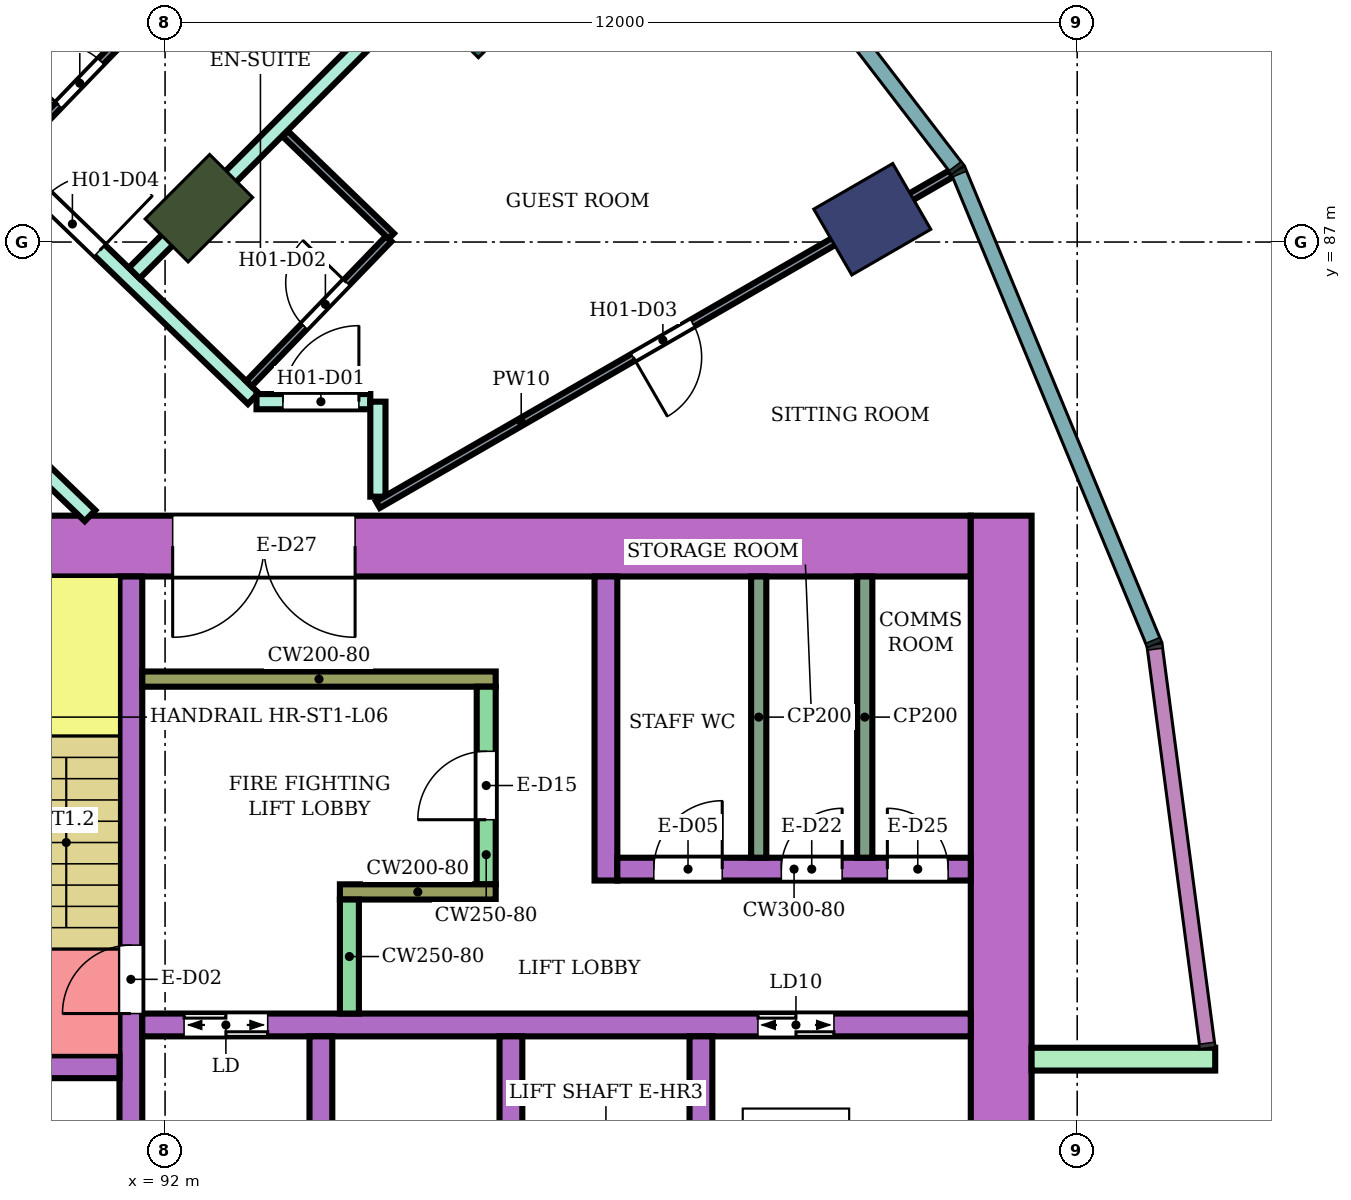
"""IFC4 building model, lengths in metres.
Left out: names, types, materials, properties, quantities, classifications, styles, units other than length and angle.
Written with IfcOpenShell. Run it as: python <this file> out.ifc"""

import sys

from ifc_helpers import new_model, si_unit, direction, frame, frame_2d, origin, origin_2d, place, context, subcontext, project, spatial, rectangle, extrude, element, fill, save


model = new_model("IFC4")
c1 = context("Model", 3, precision=1e-05, world=origin(), true_north=direction((0.0, 1.0)))
c2 = subcontext(c1, "Body", "Model", "MODEL_VIEW")
j1 = project(units=[si_unit("LENGTHUNIT", "METRE"), si_unit("PLANEANGLEUNIT", "RADIAN")], contexts=[c1])
p1 = place(None, origin())
s1 = spatial("IfcSite", under=j1, at=p1, CompositionType="ELEMENT")
p2 = place(p1, origin())
s2 = spatial("IfcBuilding", under=s1, at=p2, CompositionType="ELEMENT")
p3 = place(p2, frame((0.0, 0.0, 32.6)))
s3 = spatial("IfcBuildingStorey", under=s2, at=p3, CompositionType="ELEMENT", Elevation=32.6)
p4 = place(p3, frame((101.304, 87.3, 0.0), z_axis=(0.0, 0.0, 1.0), x_axis=(0.866025403784, 0.5, 0.0)))
e1 = element("IfcColumn", 1, at=p4, inside=s3, PredefinedType="COLUMN", context=c2, shape_type="SweptSolid", body=[
    extrude(rectangle(XDim=1.2, YDim=1.0, at=origin_2d()), origin(), (0.0, 0.0, 1.0), 3.8),
])
p5 = place(p3, frame((92.445, 87.445, 0.0), z_axis=(0.0, 0.0, 1.0), x_axis=(0.707106781187, 0.707106781187, 0.0)))
e2 = element("IfcColumn", 2, at=p5, inside=s3, PredefinedType="COLUMN", context=c2, shape_type="SweptSolid", body=[
    extrude(rectangle(XDim=1.2, YDim=0.8, at=origin_2d()), origin(), (0.0, 0.0, 1.0), 3.8),
])
p6 = place(p3, frame((95.91, 90.91, 0.0), z_axis=(0.0, 0.0, 1.0), x_axis=(0.707106781187, 0.707106781187, 0.0)))
e3 = element("IfcColumn", 3, at=p6, inside=s3, PredefinedType="COLUMN", context=c2, shape_type="SweptSolid", body=[
    extrude(rectangle(XDim=1.8, YDim=2.4, at=origin_2d()), origin(), (0.0, 0.0, 1.0), 3.8),
])
p7 = place(p3, frame((87.9, 83.0, 0.0), z_axis=(0.0, 0.0, 1.0), x_axis=(1.0, 0.0, 0.0)))
e4 = element("IfcWall", 4, at=p7, inside=s3, PredefinedType="SHEAR", context=c2, shape_type="SweptSolid", body=[
    extrude(rectangle(XDim=14.7, YDim=0.8, at=frame_2d((7.35, 0.0))), origin(), (0.0, 0.0, 1.0), 3.48),
])
p8 = place(p7, frame((4.2, 0.0, 0.0)))
e5 = element("IfcOpeningElement", 5, at=p8, cuts=e4, PredefinedType="OPENING", context=c2, shape_type="SweptSolid", body=[
    extrude(rectangle(XDim=2.4, YDim=2.4, at=frame_2d((1.2, 1.2))), frame((0.0, 0.41, 0.0), z_axis=(0.0, -1.0, 0.0), x_axis=(1.0, 0.0, 0.0)), (0.0, 0.0, 1.0), 0.82),
])
p9 = place(p3, frame((103.0, 66.6, 0.0), z_axis=(0.0, 0.0, 1.0), x_axis=(0.0, 1.0, 0.0)))
e6 = element("IfcWall", 6, at=p9, inside=s3, PredefinedType="SHEAR", context=c2, shape_type="SweptSolid", body=[
    extrude(rectangle(XDim=16.8, YDim=0.8, at=frame_2d((8.4, 0.0))), origin(), (0.0, 0.0, 1.0), 3.48),
])
p10 = place(p3, frame((91.55, 75.0, 0.0), z_axis=(0.0, 0.0, 1.0), x_axis=(0.0, 1.0, 0.0)))
e7 = element("IfcWall", 7, at=p10, inside=s3, PredefinedType="SHEAR", context=c2, shape_type="SweptSolid", body=[
    extrude(rectangle(XDim=7.6, YDim=0.3, at=frame_2d((3.8, 0.0))), origin(), (0.0, 0.0, 1.0), 3.48),
])
p11 = place(p10, frame((1.85, 0.0, 0.0)))
e8 = element("IfcOpeningElement", 8, at=p11, cuts=e7, PredefinedType="OPENING", context=c2, shape_type="SweptSolid", body=[
    extrude(rectangle(XDim=0.9, YDim=2.1, at=frame_2d((0.45, 1.05))), frame((0.0, 0.16, 0.0), z_axis=(0.0, -1.0, 0.0), x_axis=(1.0, 0.0, 0.0)), (0.0, 0.0, 1.0), 0.32),
])
p12 = place(p3, frame((88.35, 76.15, 0.0), z_axis=(0.0, 0.0, 1.0), x_axis=(1.0, 0.0, 0.0)))
e9 = element("IfcWall", 9, at=p12, inside=s3, PredefinedType="SHEAR", context=c2, shape_type="SweptSolid", body=[
    extrude(rectangle(XDim=3.05, YDim=0.3, at=frame_2d((1.525, 0.0))), origin(), (0.0, 0.0, 1.0), 3.48),
])
p13 = place(p12, frame((1.1, 0.0, 0.0)))
e10 = element("IfcOpeningElement", 10, at=p13, cuts=e9, PredefinedType="OPENING", context=c2, shape_type="SweptSolid", body=[
    extrude(rectangle(XDim=0.7, YDim=2.0, at=frame_2d((0.35, 1.0))), frame((0.0, 0.16, 0.0), z_axis=(0.0, -1.0, 0.0), x_axis=(1.0, 0.0, 0.0)), (0.0, 0.0, 1.0), 0.32),
])
p14 = place(p3, frame((91.7, 76.7, 0.0), z_axis=(0.0, 0.0, 1.0), x_axis=(1.0, 0.0, 0.0)))
e11 = element("IfcWall", 11, at=p14, inside=s3, PredefinedType="SHEAR", context=c2, shape_type="SweptSolid", body=[
    extrude(rectangle(XDim=10.9, YDim=0.3, at=frame_2d((5.45, 0.0))), origin(), (0.0, 0.0, 1.0), 3.48),
])
p15 = place(p14, frame((0.55, 0.0, 0.0)))
e12 = element("IfcOpeningElement", 12, at=p15, cuts=e11, PredefinedType="OPENING", context=c2, shape_type="SweptSolid", body=[
    extrude(rectangle(XDim=1.1, YDim=2.1, at=frame_2d((0.55, 1.05))), frame((0.0, 0.16, 0.0), z_axis=(0.0, -1.0, 0.0), x_axis=(1.0, 0.0, 0.0)), (0.0, 0.0, 1.0), 0.32),
])
p16 = place(p14, frame((8.1, 0.0, 0.0)))
e13 = element("IfcOpeningElement", 13, at=p16, cuts=e11, PredefinedType="OPENING", context=c2, shape_type="SweptSolid", body=[
    extrude(rectangle(XDim=1.0, YDim=2.1, at=frame_2d((0.5, 1.05))), frame((0.0, 0.16, 0.0), z_axis=(0.0, -1.0, 0.0), x_axis=(1.0, 0.0, 0.0)), (0.0, 0.0, 1.0), 0.32),
])
for number, where, z_axis, x_axis in (
    (14, (94.05, 74.0, 0.0), (0.0, 0.0, 1.0), (0.0, 1.0, 0.0)),
    (15, (96.55, 74.0, 0.0), (0.0, 0.0, 1.0), (0.0, 1.0, 0.0)),
    (16, (99.05, 74.0, 0.0), (0.0, 0.0, 1.0), (0.0, 1.0, 0.0)),
):
    element("IfcWall", number, at=place(p3, frame(where, z_axis=z_axis, x_axis=x_axis)), inside=s3, PredefinedType="SHEAR", context=c2, shape_type="SweptSolid", body=[
        extrude(rectangle(XDim=2.55, YDim=0.3, at=frame_2d((1.275, 0.0))), origin(), (0.0, 0.0, 1.0), 3.48),
    ])
p17 = place(p3, frame((91.7, 81.25, 0.0), z_axis=(0.0, 0.0, 1.0), x_axis=(1.0, 0.0, 0.0)))
e17 = element("IfcWall", 17, at=p17, inside=s3, PredefinedType="SHEAR", context=c2, shape_type="SweptSolid", body=[
    extrude(rectangle(XDim=4.65, YDim=0.2, at=frame_2d((2.325, 0.0))), origin(), (0.0, 0.0, 1.0), 3.48),
])
p18 = place(p3, frame((96.225, 78.55, 0.0), z_axis=(0.0, 0.0, 1.0), x_axis=(0.0, 1.0, 0.0)))
e18 = element("IfcWall", 18, at=p18, inside=s3, PredefinedType="SHEAR", context=c2, shape_type="SweptSolid", body=[
    extrude(rectangle(XDim=2.6, YDim=0.25, at=frame_2d((1.3, 0.0))), origin(), (0.0, 0.0, 1.0), 3.48),
])
p19 = place(p18, frame((0.85, 0.0, 0.0)))
e19 = element("IfcOpeningElement", 19, at=p19, cuts=e18, PredefinedType="OPENING", context=c2, shape_type="SweptSolid", body=[
    extrude(rectangle(XDim=0.9, YDim=2.1, at=frame_2d((0.45, 1.05))), frame((0.0, 0.135, 0.0), z_axis=(0.0, -1.0, 0.0), x_axis=(1.0, 0.0, 0.0)), (0.0, 0.0, 1.0), 0.27),
])
p20 = place(p3, frame((94.3, 78.45, 0.0), z_axis=(0.0, 0.0, 1.0), x_axis=(1.0, 0.0, 0.0)))
e20 = element("IfcWall", 20, at=p20, inside=s3, PredefinedType="SHEAR", context=c2, shape_type="SweptSolid", body=[
    extrude(rectangle(XDim=2.05, YDim=0.2, at=frame_2d((1.025, 0.0))), origin(), (0.0, 0.0, 1.0), 3.48),
])
p21 = place(p3, frame((94.425, 76.85, 0.0), z_axis=(0.0, 0.0, 1.0), x_axis=(0.0, 1.0, 0.0)))
e21 = element("IfcWall", 21, at=p21, inside=s3, PredefinedType="SHEAR", context=c2, shape_type="SweptSolid", body=[
    extrude(rectangle(XDim=1.5, YDim=0.25, at=frame_2d((0.75, 0.0))), origin(), (0.0, 0.0, 1.0), 3.48),
])
p22 = place(p3, frame((97.8, 78.6, 0.0), z_axis=(0.0, 0.0, 1.0), x_axis=(0.0, 1.0, 0.0)))
e22 = element("IfcWall", 22, at=p22, inside=s3, PredefinedType="SHEAR", context=c2, shape_type="SweptSolid", body=[
    extrude(rectangle(XDim=4.0, YDim=0.3, at=frame_2d((2.0, 0.0))), origin(), (0.0, 0.0, 1.0), 3.48),
])
p23 = place(p3, frame((97.95, 78.75, 0.0), z_axis=(0.0, 0.0, 1.0), x_axis=(1.0, 0.0, 0.0)))
e23 = element("IfcWall", 23, at=p23, inside=s3, PredefinedType="SHEAR", context=c2, shape_type="SweptSolid", body=[
    extrude(rectangle(XDim=4.65, YDim=0.3, at=frame_2d((2.325, 0.0))), origin(), (0.0, 0.0, 1.0), 3.48),
])
p24 = place(p23, frame((0.48, 0.0, 0.0)))
e24 = element("IfcOpeningElement", 24, at=p24, cuts=e23, PredefinedType="OPENING", context=c2, shape_type="SweptSolid", body=[
    extrude(rectangle(XDim=0.9, YDim=2.1, at=frame_2d((0.45, 1.05))), frame((0.0, 0.16, 0.0), z_axis=(0.0, -1.0, 0.0), x_axis=(1.0, 0.0, 0.0)), (0.0, 0.0, 1.0), 0.32),
])
p25 = place(p23, frame((2.157, 0.0, 0.0)))
e25 = element("IfcOpeningElement", 25, at=p25, cuts=e23, PredefinedType="OPENING", context=c2, shape_type="SweptSolid", body=[
    extrude(rectangle(XDim=0.8, YDim=2.1, at=frame_2d((0.4, 1.05))), frame((0.0, 0.16, 0.0), z_axis=(0.0, -1.0, 0.0), x_axis=(1.0, 0.0, 0.0)), (0.0, 0.0, 1.0), 0.32),
])
p26 = place(p23, frame((3.552, 0.0, 0.0)))
e26 = element("IfcOpeningElement", 26, at=p26, cuts=e23, PredefinedType="OPENING", context=c2, shape_type="SweptSolid", body=[
    extrude(rectangle(XDim=0.8, YDim=2.1, at=frame_2d((0.4, 1.05))), frame((0.0, 0.16, 0.0), z_axis=(0.0, -1.0, 0.0), x_axis=(1.0, 0.0, 0.0)), (0.0, 0.0, 1.0), 0.32),
])
p27 = place(p3, frame((103.4, 76.25, 0.0), z_axis=(0.0, 0.0, 1.0), x_axis=(1.0, 0.0, 0.0)))
e27 = element("IfcWall", 27, at=p27, inside=s3, PredefinedType="NOTDEFINED", context=c2, shape_type="SweptSolid", body=[
    extrude(rectangle(XDim=2.416, YDim=0.3, at=frame_2d((1.208, 0.0))), origin(), (0.0, 0.0, 1.0), 3.8),
])
p28 = place(p3, frame((87.064, 87.211, 0.0), z_axis=(0.0, 0.0, 1.0), x_axis=(0.719540958932, -0.694450004262, 0.0)))
e28 = element("IfcWall", 28, at=p28, inside=s3, PredefinedType="PARTITIONING", context=c2, shape_type="SweptSolid", body=[
    extrude(rectangle(XDim=5.488, YDim=0.2, at=frame_2d((2.744, 0.0))), origin(), (0.0, 0.0, 1.0), 3.35),
])
p29 = place(p28, frame((0.55, 0.0, 0.0)))
e29 = element("IfcOpeningElement", 29, at=p29, cuts=e28, PredefinedType="OPENING", context=c2, shape_type="SweptSolid", body=[
    extrude(rectangle(XDim=1.0, YDim=2.1, at=frame_2d((0.5, 1.05))), frame((0.0, 0.11, 0.0), z_axis=(0.0, -1.0, 0.0), x_axis=(1.0, 0.0, 0.0)), (0.0, 0.0, 1.0), 0.22),
])
p30 = place(p3, frame((88.465, 89.473, 0.0), z_axis=(0.0, 0.0, 1.0), x_axis=(0.719457552421, -0.694536413922, 0.0)))
e30 = element("IfcWall", 30, at=p30, inside=s3, PredefinedType="PARTITIONING", context=c2, shape_type="SweptSolid", body=[
    extrude(rectangle(XDim=6.524, YDim=0.2, at=frame_2d((3.262, 0.0))), origin(), (0.0, 0.0, 1.0), 3.35),
])
p31 = place(p30, frame((2.719, 0.0, 0.0)))
e31 = element("IfcOpeningElement", 31, at=p31, cuts=e30, PredefinedType="OPENING", context=c2, shape_type="SweptSolid", body=[
    extrude(rectangle(XDim=1.0, YDim=2.1, at=frame_2d((0.5, 1.05))), frame((0.0, 0.11, 0.0), z_axis=(0.0, -1.0, 0.0), x_axis=(1.0, 0.0, 0.0)), (0.0, 0.0, 1.0), 0.22),
])
p32 = place(p3, frame((88.4, 89.538, 0.0), z_axis=(0.0, 0.0, 1.0), x_axis=(0.5002401188, 0.865886726739, 0.0)))
e32 = element("IfcWall", 32, at=p32, inside=s3, PredefinedType="PARTITIONING", context=c2, shape_type="SweptSolid", body=[
    extrude(rectangle(XDim=9.008, YDim=0.2, at=frame_2d((4.504, 0.0))), origin(), (0.0, 0.0, 1.0), 3.35),
])
p33 = place(p3, frame((91.594, 86.591, 0.0), z_axis=(0.0, 0.0, 1.0), x_axis=(0.707214399597, 0.706999146394, 0.0)))
e33 = element("IfcWall", 33, at=p33, inside=s3, PredefinedType="PARTITIONING", context=c2, shape_type="SweptSolid", body=[
    extrude(rectangle(XDim=6.805, YDim=0.2, at=frame_2d((3.403, 0.0))), origin(), (0.0, 0.0, 1.0), 3.35),
])
p34 = place(p3, frame((93.203, 84.9, 0.0), z_axis=(0.0, 0.0, 1.0), x_axis=(1.0, 0.0, 0.0)))
e34 = element("IfcWall", 34, at=p34, inside=s3, PredefinedType="PARTITIONING", context=c2, shape_type="SweptSolid", body=[
    extrude(rectangle(XDim=1.497, YDim=0.2, at=frame_2d((0.749, 0.0))), origin(), (0.0, 0.0, 1.0), 3.35),
])
p35 = place(p34, frame((0.347, 0.0, 0.0)))
e35 = element("IfcOpeningElement", 35, at=p35, cuts=e34, PredefinedType="OPENING", context=c2, shape_type="SweptSolid", body=[
    extrude(rectangle(XDim=1.0, YDim=2.1, at=frame_2d((0.5, 1.05))), frame((0.0, 0.11, 0.0), z_axis=(0.0, -1.0, 0.0), x_axis=(1.0, 0.0, 0.0)), (0.0, 0.0, 1.0), 0.22),
])
p36 = place(p3, frame((94.8, 83.65, 0.0), z_axis=(0.0, 0.0, 1.0), x_axis=(0.0, 1.0, 0.0)))
e36 = element("IfcWall", 36, at=p36, inside=s3, PredefinedType="PARTITIONING", context=c2, shape_type="SweptSolid", body=[
    extrude(rectangle(XDim=1.25, YDim=0.2, at=frame_2d((0.625, 0.0))), origin(), (0.0, 0.0, 1.0), 3.35),
])
p37 = place(p3, frame((89.976, 88.154, 0.0), z_axis=(0.0, 0.0, 1.0), x_axis=(0.6945137956, 0.719479386585, 0.0)))
e37 = element("IfcWall", 37, at=p37, inside=s3, PredefinedType="PARTITIONING", context=c2, shape_type="SweptSolid", body=[
    extrude(rectangle(XDim=2.699, YDim=0.1, at=frame_2d((1.35, 0.0))), origin(), (0.0, 0.0, 1.0), 3.35),
])
p38 = place(p37, frame((0.9, 0.0, 0.0)))
e38 = element("IfcOpeningElement", 38, at=p38, cuts=e37, PredefinedType="OPENING", context=c2, shape_type="SweptSolid", body=[
    extrude(rectangle(XDim=0.8, YDim=2.1, at=frame_2d((0.4, 1.05))), frame((0.0, 0.06, 0.0), z_axis=(0.0, -1.0, 0.0), x_axis=(1.0, 0.0, 0.0)), (0.0, 0.0, 1.0), 0.12),
])
p39 = place(p3, frame((93.103, 85.136, 0.0), z_axis=(0.0, 0.0, 1.0), x_axis=(0.694324808789, 0.719661767708, 0.0)))
e39 = element("IfcWall", 39, at=p39, inside=s3, PredefinedType="PARTITIONING", context=c2, shape_type="SweptSolid", body=[
    extrude(rectangle(XDim=2.65, YDim=0.1, at=frame_2d((1.325, 0.0))), origin(), (0.0, 0.0, 1.0), 3.35),
])
p40 = place(p39, frame((1.05, 0.0, 0.0)))
e40 = element("IfcOpeningElement", 40, at=p40, cuts=e39, PredefinedType="OPENING", context=c2, shape_type="SweptSolid", body=[
    extrude(rectangle(XDim=0.8, YDim=2.1, at=frame_2d((0.4, 1.05))), frame((0.0, 0.06, 0.0), z_axis=(0.0, -1.0, 0.0), x_axis=(1.0, 0.0, 0.0)), (0.0, 0.0, 1.0), 0.12),
])
p41 = place(p3, frame((93.581, 88.425, 0.0), z_axis=(0.0, 0.0, 1.0), x_axis=(0.719336381931, -0.694661910307, 0.0)))
e41 = element("IfcWall", 41, at=p41, inside=s3, PredefinedType="PARTITIONING", context=c2, shape_type="SweptSolid", body=[
    extrude(rectangle(XDim=1.939, YDim=0.1, at=frame_2d((0.97, 0.0))), origin(), (0.0, 0.0, 1.0), 3.35),
])
p42 = place(p3, frame((94.8, 83.545, 0.0), z_axis=(0.0, 0.0, 1.0), x_axis=(0.86602264145, 0.500004784474, 0.0)))
e42 = element("IfcWall", 42, at=p42, inside=s3, PredefinedType="PARTITIONING", context=c2, shape_type="SweptSolid", body=[
    extrude(rectangle(XDim=8.708, YDim=0.1, at=frame_2d((4.354, 0.0))), origin(), (0.0, 0.0, 1.0), 3.35),
])
p43 = place(p42, frame((3.879, 0.0, 0.0)))
e43 = element("IfcOpeningElement", 43, at=p43, cuts=e42, PredefinedType="OPENING", context=c2, shape_type="SweptSolid", body=[
    extrude(rectangle(XDim=0.9, YDim=2.1, at=frame_2d((0.45, 1.05))), frame((0.0, 0.06, 0.0), z_axis=(0.0, -1.0, 0.0), x_axis=(1.0, 0.0, 0.0)), (0.0, 0.0, 1.0), 0.12),
])
for number, where, z_axis, x_axis in (
    (44, (99.81, 78.9, 0.0), (0.0, 0.0, 1.0), (0.0, 1.0, 0.0)),
    (45, (101.205, 78.9, 0.0), (0.0, 0.0, 1.0), (0.0, 1.0, 0.0)),
):
    element("IfcWall", number, at=place(p3, frame(where, z_axis=z_axis, x_axis=x_axis)), inside=s3, PredefinedType="PARTITIONING", context=c2, shape_type="SweptSolid", body=[
        extrude(rectangle(XDim=3.7, YDim=0.2, at=frame_2d((1.85, 0.0))), origin(), (0.0, 0.0, 1.0), 3.48),
    ])
p44 = place(p35, origin())
e46 = element("IfcDoor", 46, at=p44, inside=s3, OperationType="SINGLE_SWING_RIGHT", PredefinedType="DOOR", context=c2, shape_type="SweptSolid", body=[
    extrude(rectangle(XDim=1.0, YDim=2.1, at=frame_2d((0.5, 1.05))), frame((0.0, 0.025, 0.0), z_axis=(0.0, -1.0, 0.0), x_axis=(1.0, 0.0, 0.0)), (0.0, 0.0, 1.0), 0.05),
])
fill(e35, e46)
p45 = place(p40, origin())
e47 = element("IfcDoor", 47, at=p45, inside=s3, OperationType="SINGLE_SWING_RIGHT", PredefinedType="DOOR", context=c2, shape_type="SweptSolid", body=[
    extrude(rectangle(XDim=0.8, YDim=2.1, at=frame_2d((0.4, 1.05))), frame((0.0, 0.025, 0.0), z_axis=(0.0, -1.0, 0.0), x_axis=(1.0, 0.0, 0.0)), (0.0, 0.0, 1.0), 0.05),
])
fill(e40, e47)
p46 = place(p43, frame((0.9, 0.0, 0.0), z_axis=(0.0, 0.0, 1.0), x_axis=(-1.0, 0.0, 0.0)))
e48 = element("IfcDoor", 48, at=p46, inside=s3, OperationType="SINGLE_SWING_RIGHT", PredefinedType="DOOR", context=c2, shape_type="SweptSolid", body=[
    extrude(rectangle(XDim=0.9, YDim=2.1, at=frame_2d((0.45, 1.05))), frame((0.0, 0.025, 0.0), z_axis=(0.0, -1.0, 0.0), x_axis=(1.0, 0.0, 0.0)), (0.0, 0.0, 1.0), 0.05),
])
fill(e43, e48)
p47 = place(p31, origin())
e49 = element("IfcDoor", 49, at=p47, inside=s3, OperationType="SINGLE_SWING_RIGHT", PredefinedType="DOOR", context=c2, shape_type="SweptSolid", body=[
    extrude(rectangle(XDim=1.0, YDim=2.1, at=frame_2d((0.5, 1.05))), frame((0.0, 0.025, 0.0), z_axis=(0.0, -1.0, 0.0), x_axis=(1.0, 0.0, 0.0)), (0.0, 0.0, 1.0), 0.05),
])
fill(e31, e49)
p48 = place(p38, origin())
e50 = element("IfcDoor", 50, at=p48, inside=s3, OperationType="SINGLE_SWING_LEFT", PredefinedType="DOOR", context=c2, shape_type="SweptSolid", body=[
    extrude(rectangle(XDim=0.8, YDim=2.1, at=frame_2d((0.4, 1.05))), frame((0.0, 0.025, 0.0), z_axis=(0.0, -1.0, 0.0), x_axis=(1.0, 0.0, 0.0)), (0.0, 0.0, 1.0), 0.05),
])
fill(e38, e50)
p49 = place(p11, origin())
e51 = element("IfcDoor", 51, at=p49, inside=s3, OperationType="SINGLE_SWING_LEFT", PredefinedType="DOOR", context=c2, shape_type="SweptSolid", body=[
    extrude(rectangle(XDim=0.9, YDim=2.1, at=frame_2d((0.45, 1.05))), frame((0.0, 0.025, 0.0), z_axis=(0.0, -1.0, 0.0), x_axis=(1.0, 0.0, 0.0)), (0.0, 0.0, 1.0), 0.05),
])
fill(e8, e51)
p50 = place(p15, origin())
e52 = element("IfcDoor", 52, at=p50, inside=s3, OperationType="DOUBLE_DOOR_SLIDING", PredefinedType="DOOR", context=c2, shape_type="SweptSolid", body=[
    extrude(rectangle(XDim=1.1, YDim=2.1, at=frame_2d((0.55, 1.05))), frame((0.0, 0.025, 0.0), z_axis=(0.0, -1.0, 0.0), x_axis=(1.0, 0.0, 0.0)), (0.0, 0.0, 1.0), 0.05),
])
fill(e12, e52)
p51 = place(p16, origin())
e53 = element("IfcDoor", 53, at=p51, inside=s3, OperationType="DOUBLE_DOOR_SLIDING", PredefinedType="DOOR", context=c2, shape_type="SweptSolid", body=[
    extrude(rectangle(XDim=1.0, YDim=2.1, at=frame_2d((0.5, 1.05))), frame((0.0, 0.025, 0.0), z_axis=(0.0, -1.0, 0.0), x_axis=(1.0, 0.0, 0.0)), (0.0, 0.0, 1.0), 0.05),
])
fill(e13, e53)
p52 = place(p19, origin())
e54 = element("IfcDoor", 54, at=p52, inside=s3, OperationType="SINGLE_SWING_LEFT", PredefinedType="DOOR", context=c2, shape_type="SweptSolid", body=[
    extrude(rectangle(XDim=0.9, YDim=2.1, at=frame_2d((0.45, 1.05))), frame((0.0, 0.025, 0.0), z_axis=(0.0, -1.0, 0.0), x_axis=(1.0, 0.0, 0.0)), (0.0, 0.0, 1.0), 0.05),
])
fill(e19, e54)
p53 = place(p24, origin())
e55 = element("IfcDoor", 55, at=p53, inside=s3, OperationType="SINGLE_SWING_RIGHT", PredefinedType="DOOR", context=c2, shape_type="SweptSolid", body=[
    extrude(rectangle(XDim=0.9, YDim=2.1, at=frame_2d((0.45, 1.05))), frame((0.0, 0.025, 0.0), z_axis=(0.0, -1.0, 0.0), x_axis=(1.0, 0.0, 0.0)), (0.0, 0.0, 1.0), 0.05),
])
fill(e24, e55)
p54 = place(p25, origin())
e56 = element("IfcDoor", 56, at=p54, inside=s3, OperationType="SINGLE_SWING_RIGHT", PredefinedType="DOOR", context=c2, shape_type="SweptSolid", body=[
    extrude(rectangle(XDim=0.8, YDim=2.1, at=frame_2d((0.4, 1.05))), frame((0.0, 0.025, 0.0), z_axis=(0.0, -1.0, 0.0), x_axis=(1.0, 0.0, 0.0)), (0.0, 0.0, 1.0), 0.05),
])
fill(e25, e56)
p55 = place(p26, origin())
e57 = element("IfcDoor", 57, at=p55, inside=s3, OperationType="SINGLE_SWING_LEFT", PredefinedType="DOOR", context=c2, shape_type="SweptSolid", body=[
    extrude(rectangle(XDim=0.8, YDim=2.1, at=frame_2d((0.4, 1.05))), frame((0.0, 0.025, 0.0), z_axis=(0.0, -1.0, 0.0), x_axis=(1.0, 0.0, 0.0)), (0.0, 0.0, 1.0), 0.05),
])
fill(e26, e57)
p56 = place(p8, frame((2.4, 0.0, 0.0), z_axis=(0.0, 0.0, 1.0), x_axis=(-1.0, 0.0, 0.0)))
e58 = element("IfcDoor", 58, at=p56, inside=s3, OperationType="DOUBLE_DOOR_SINGLE_SWING", PredefinedType="DOOR", context=c2, shape_type="SweptSolid", body=[
    extrude(rectangle(XDim=2.4, YDim=2.4, at=frame_2d((1.2, 1.2))), frame((0.0, 0.025, 0.0), z_axis=(0.0, -1.0, 0.0), x_axis=(1.0, 0.0, 0.0)), (0.0, 0.0, 1.0), 0.05),
])
fill(e5, e58)
save(model, sys.argv[1])
